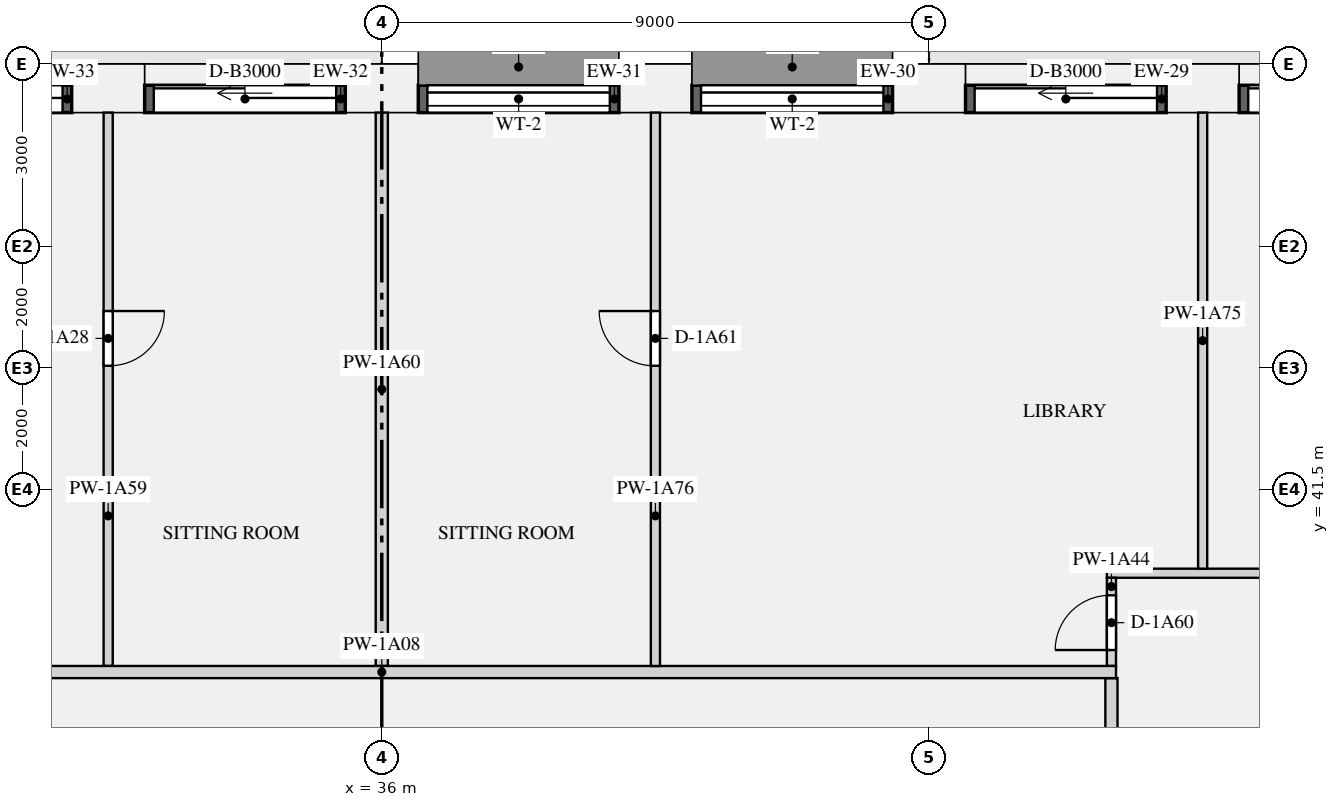
"""IFC4 building model, lengths in metres.
Left out: names, types, materials, properties, quantities, classifications, styles, units other than length and angle.
Written with IfcOpenShell. Run it as: python <this file> out.ifc"""

import sys

from ifc_helpers import new_model, si_unit, direction, frame, frame_2d, origin, origin_2d, place, context, subcontext, project, spatial, rectangle, extrude, element, fill, save


model = new_model("IFC4")
c1 = context("Model", 3, precision=1e-05, world=origin(), true_north=direction((0.0, 1.0)))
c2 = subcontext(c1, "Body", "Model", "MODEL_VIEW")
j1 = project(units=[si_unit("LENGTHUNIT", "METRE"), si_unit("PLANEANGLEUNIT", "RADIAN")], contexts=[c1])
p1 = place(None, origin())
s1 = spatial("IfcSite", under=j1, at=p1, CompositionType="ELEMENT")
p2 = place(p1, origin())
s2 = spatial("IfcBuilding", under=s1, at=p2, CompositionType="ELEMENT")
p3 = place(p2, frame((0.0, 0.0, 19.5)))
s3 = spatial("IfcBuildingStorey", under=s2, at=p3, CompositionType="ELEMENT", Elevation=19.5)
p4 = place(p3, frame((49.5, 48.1, -0.32), z_axis=(0.0, 0.0, 1.0), x_axis=(-1.0, 0.0, 0.0)))
e1 = element("IfcColumn", 1, at=p4, inside=s3, PredefinedType="USERDEFINED", context=c2, shape_type="SweptSolid", body=[
    extrude(rectangle(XDim=1.2, YDim=0.8, at=origin_2d()), origin(), (0.0, 0.0, 1.0), 3.47),
])
p5 = place(p3, frame((45.0, 48.1, 0.0), z_axis=(0.0, 0.0, 1.0), x_axis=(-1.0, 0.0, 0.0)))
e2 = element("IfcColumn", 2, at=p5, inside=s3, PredefinedType="USERDEFINED", context=c2, shape_type="SweptSolid", body=[
    extrude(rectangle(XDim=1.2, YDim=0.8, at=origin_2d()), origin(), (0.0, 0.0, 1.0), 3.15),
])
p6 = place(p3, frame((40.5, 48.1, -0.32), z_axis=(0.0, 0.0, 1.0), x_axis=(-1.0, 0.0, 0.0)))
e3 = element("IfcColumn", 3, at=p6, inside=s3, PredefinedType="USERDEFINED", context=c2, shape_type="SweptSolid", body=[
    extrude(rectangle(XDim=1.2, YDim=0.8, at=origin_2d()), origin(), (0.0, 0.0, 1.0), 3.47),
])
p7 = place(p3, frame((36.0, 48.1, 0.0), z_axis=(0.0, 0.0, 1.0), x_axis=(-1.0, 0.0, 0.0)))
e4 = element("IfcColumn", 4, at=p7, inside=s3, PredefinedType="USERDEFINED", context=c2, shape_type="SweptSolid", body=[
    extrude(rectangle(XDim=1.2, YDim=0.8, at=origin_2d()), origin(), (0.0, 0.0, 1.0), 3.15),
])
p8 = place(p3, frame((31.5, 48.1, -0.32), z_axis=(0.0, 0.0, 1.0), x_axis=(-1.0, 0.0, 0.0)))
e5 = element("IfcColumn", 5, at=p8, inside=s3, PredefinedType="USERDEFINED", context=c2, shape_type="SweptSolid", body=[
    extrude(rectangle(XDim=1.2, YDim=0.8, at=origin_2d()), origin(), (0.0, 0.0, 1.0), 3.47),
])
p9 = place(p3, frame((53.4, 47.925, 0.0), z_axis=(0.0, 0.0, 1.0), x_axis=(-1.0, 0.0, 0.0)))
e6 = element("IfcWall", 6, at=p9, inside=s3, PredefinedType="SOLIDWALL", context=c2, shape_type="SweptSolid", body=[
    extrude(rectangle(XDim=3.3, YDim=0.45, at=frame_2d((1.65, 0.0))), origin(), (0.0, 0.0, 1.0), 2.83),
])
p10 = place(p9, frame((0.15, 0.0, 0.0)))
e7 = element("IfcOpeningElement", 7, at=p10, cuts=e6, PredefinedType="OPENING", context=c2, shape_type="SweptSolid", body=[
    extrude(rectangle(XDim=3.0, YDim=2.3, at=frame_2d((1.5, 1.15))), frame((0.0, 0.235, 0.0), z_axis=(0.0, -1.0, 0.0), x_axis=(1.0, 0.0, 0.0)), (0.0, 0.0, 1.0), 0.47),
])
p11 = place(p3, frame((48.9, 47.925, 0.0), z_axis=(0.0, 0.0, 1.0), x_axis=(-1.0, 0.0, 0.0)))
e8 = element("IfcWall", 8, at=p11, inside=s3, PredefinedType="SOLIDWALL", context=c2, shape_type="SweptSolid", body=[
    extrude(rectangle(XDim=3.3, YDim=0.45, at=frame_2d((1.65, 0.0))), origin(), (0.0, 0.0, 1.0), 2.83),
])
p12 = place(p11, frame((0.15, 0.0, 0.0)))
e9 = element("IfcOpeningElement", 9, at=p12, cuts=e8, PredefinedType="OPENING", context=c2, shape_type="SweptSolid", body=[
    extrude(rectangle(XDim=3.0, YDim=2.3, at=frame_2d((1.5, 1.15))), frame((0.0, 0.235, 0.0), z_axis=(0.0, -1.0, 0.0), x_axis=(1.0, 0.0, 0.0)), (0.0, 0.0, 1.0), 0.47),
])
p13 = place(p3, frame((44.4, 47.925, 0.9), z_axis=(0.0, 0.0, 1.0), x_axis=(-1.0, 0.0, 0.0)))
e10 = element("IfcWall", 10, at=p13, inside=s3, PredefinedType="SOLIDWALL", context=c2, shape_type="SweptSolid", body=[
    extrude(rectangle(XDim=3.3, YDim=0.45, at=frame_2d((1.65, 0.0))), origin(), (0.0, 0.0, 1.0), 1.93),
])
p14 = place(p13, frame((0.15, 0.0, 0.15)))
e11 = element("IfcOpeningElement", 11, at=p14, cuts=e10, PredefinedType="OPENING", context=c2, shape_type="SweptSolid", body=[
    extrude(rectangle(XDim=3.0, YDim=1.5, at=frame_2d((1.5, 0.75))), frame((0.0, 0.235, 0.0), z_axis=(0.0, -1.0, 0.0), x_axis=(1.0, 0.0, 0.0)), (0.0, 0.0, 1.0), 0.47),
])
p15 = place(p3, frame((39.9, 47.925, 0.9), z_axis=(0.0, 0.0, 1.0), x_axis=(-1.0, 0.0, 0.0)))
e12 = element("IfcWall", 12, at=p15, inside=s3, PredefinedType="SOLIDWALL", context=c2, shape_type="SweptSolid", body=[
    extrude(rectangle(XDim=3.3, YDim=0.45, at=frame_2d((1.65, 0.0))), origin(), (0.0, 0.0, 1.0), 1.93),
])
p16 = place(p15, frame((0.15, 0.0, 0.15)))
e13 = element("IfcOpeningElement", 13, at=p16, cuts=e12, PredefinedType="OPENING", context=c2, shape_type="SweptSolid", body=[
    extrude(rectangle(XDim=3.0, YDim=1.5, at=frame_2d((1.5, 0.75))), frame((0.0, 0.235, 0.0), z_axis=(0.0, -1.0, 0.0), x_axis=(1.0, 0.0, 0.0)), (0.0, 0.0, 1.0), 0.47),
])
p17 = place(p3, frame((35.4, 47.925, 0.0), z_axis=(0.0, 0.0, 1.0), x_axis=(-1.0, 0.0, 0.0)))
e14 = element("IfcWall", 14, at=p17, inside=s3, PredefinedType="SOLIDWALL", context=c2, shape_type="SweptSolid", body=[
    extrude(rectangle(XDim=3.3, YDim=0.45, at=frame_2d((1.65, 0.0))), origin(), (0.0, 0.0, 1.0), 2.83),
])
p18 = place(p17, frame((0.15, 0.0, 0.0)))
e15 = element("IfcOpeningElement", 15, at=p18, cuts=e14, PredefinedType="OPENING", context=c2, shape_type="SweptSolid", body=[
    extrude(rectangle(XDim=3.0, YDim=2.3, at=frame_2d((1.5, 1.15))), frame((0.0, 0.235, 0.0), z_axis=(0.0, -1.0, 0.0), x_axis=(1.0, 0.0, 0.0)), (0.0, 0.0, 1.0), 0.47),
])
p19 = place(p3, frame((30.9, 47.925, 0.0), z_axis=(0.0, 0.0, 1.0), x_axis=(-1.0, 0.0, 0.0)))
e16 = element("IfcWall", 16, at=p19, inside=s3, PredefinedType="SOLIDWALL", context=c2, shape_type="SweptSolid", body=[
    extrude(rectangle(XDim=3.3, YDim=0.45, at=frame_2d((1.65, 0.0))), origin(), (0.0, 0.0, 1.0), 2.83),
])
p20 = place(p19, frame((0.15, 0.0, 0.0)))
e17 = element("IfcOpeningElement", 17, at=p20, cuts=e16, PredefinedType="OPENING", context=c2, shape_type="SweptSolid", body=[
    extrude(rectangle(XDim=3.0, YDim=2.3, at=frame_2d((1.5, 1.15))), frame((0.0, 0.235, 0.0), z_axis=(0.0, -1.0, 0.0), x_axis=(1.0, 0.0, 0.0)), (0.0, 0.0, 1.0), 0.47),
])
p21 = place(p3, frame((23.925, 38.5, 0.0), z_axis=(0.0, 0.0, 1.0), x_axis=(1.0, 0.0, 0.0)))
e18 = element("IfcWall", 18, at=p21, inside=s3, PredefinedType="PARTITIONING", context=c2, shape_type="SweptSolid", body=[
    extrude(rectangle(XDim=24.15, YDim=0.2, at=frame_2d((12.075, 0.0))), origin(), (0.0, 0.0, 1.0), 2.83),
])
p22 = place(p3, frame((47.925, 40.125, 0.0), z_axis=(0.0, 0.0, 1.0), x_axis=(1.0, 0.0, 0.0)))
e19 = element("IfcWall", 19, at=p22, inside=s3, PredefinedType="PARTITIONING", context=c2, shape_type="SweptSolid", body=[
    extrude(rectangle(XDim=27.775, YDim=0.15, at=frame_2d((13.887, 0.0))), origin(), (0.0, 0.0, 1.0), 2.83),
])
p23 = place(p22, frame((16.875, 0.0, 0.0)))
e20 = element("IfcOpeningElement", 20, at=p23, cuts=e19, PredefinedType="OPENING", context=c2, shape_type="SweptSolid", body=[
    extrude(rectangle(XDim=0.9, YDim=2.1, at=frame_2d((0.45, 1.05))), frame((0.0, 0.085, 0.0), z_axis=(0.0, -1.0, 0.0), x_axis=(1.0, 0.0, 0.0)), (0.0, 0.0, 1.0), 0.17),
])
p24 = place(p22, frame((13.025, 0.0, 0.0)))
e21 = element("IfcOpeningElement", 21, at=p24, cuts=e19, PredefinedType="OPENING", context=c2, shape_type="SweptSolid", body=[
    extrude(rectangle(XDim=0.9, YDim=2.1, at=frame_2d((0.45, 1.05))), frame((0.0, 0.085, 0.0), z_axis=(0.0, -1.0, 0.0), x_axis=(1.0, 0.0, 0.0)), (0.0, 0.0, 1.0), 0.17),
])
p25 = place(p22, frame((3.375, 0.0, 0.0)))
e22 = element("IfcOpeningElement", 22, at=p25, cuts=e19, PredefinedType="OPENING", context=c2, shape_type="SweptSolid", body=[
    extrude(rectangle(XDim=0.9, YDim=2.1, at=frame_2d((0.45, 1.05))), frame((0.0, 0.085, 0.0), z_axis=(0.0, -1.0, 0.0), x_axis=(1.0, 0.0, 0.0)), (0.0, 0.0, 1.0), 0.17),
])
p26 = place(p22, frame((25.55, 0.0, 0.0)))
e23 = element("IfcOpeningElement", 23, at=p26, cuts=e19, PredefinedType="OPENING", context=c2, shape_type="SweptSolid", body=[
    extrude(rectangle(XDim=0.9, YDim=2.1, at=frame_2d((0.45, 1.05))), frame((0.0, 0.085, 0.0), z_axis=(0.0, -1.0, 0.0), x_axis=(1.0, 0.0, 0.0)), (0.0, 0.0, 1.0), 0.17),
])
p27 = place(p3, frame((48.0, 38.6, 0.0), z_axis=(0.0, 0.0, 1.0), x_axis=(0.0, 1.0, 0.0)))
e24 = element("IfcWall", 24, at=p27, inside=s3, PredefinedType="PARTITIONING", context=c2, shape_type="SweptSolid", body=[
    extrude(rectangle(XDim=1.45, YDim=0.15, at=frame_2d((0.725, 0.0))), origin(), (0.0, 0.0, 1.0), 2.83),
])
p28 = place(p27, frame((0.262, 0.0, 0.0)))
e25 = element("IfcOpeningElement", 25, at=p28, cuts=e24, PredefinedType="OPENING", context=c2, shape_type="SweptSolid", body=[
    extrude(rectangle(XDim=0.9, YDim=2.1, at=frame_2d((0.45, 1.05))), frame((0.0, 0.085, 0.0), z_axis=(0.0, -1.0, 0.0), x_axis=(1.0, 0.0, 0.0)), (0.0, 0.0, 1.0), 0.17),
])
p29 = place(p3, frame((48.0, 27.1, 0.0), z_axis=(0.0, 0.0, 1.0), x_axis=(0.0, 1.0, 0.0)))
e26 = element("IfcWall", 26, at=p29, inside=s3, PredefinedType="PARTITIONING", context=c2, shape_type="SweptSolid", body=[
    extrude(rectangle(XDim=11.3, YDim=0.2, at=frame_2d((5.65, 0.0))), origin(), (0.0, 0.0, 1.0), 2.83),
])
p30 = place(p29, frame((5.35, 0.0, 0.0)))
e27 = element("IfcOpeningElement", 27, at=p30, cuts=e26, PredefinedType="OPENING", context=c2, shape_type="SweptSolid", body=[
    extrude(rectangle(XDim=1.1, YDim=2.1, at=frame_2d((0.55, 1.05))), frame((0.0, 0.11, 0.0), z_axis=(0.0, -1.0, 0.0), x_axis=(1.0, 0.0, 0.0)), (0.0, 0.0, 1.0), 0.22),
])
p31 = place(p3, frame((31.5, 38.6, 0.0), z_axis=(0.0, 0.0, 1.0), x_axis=(0.0, 1.0, 0.0)))
e28 = element("IfcWall", 28, at=p31, inside=s3, PredefinedType="PARTITIONING", context=c2, shape_type="SweptSolid", body=[
    extrude(rectangle(XDim=9.1, YDim=0.15, at=frame_2d((4.55, 0.0))), origin(), (0.0, 0.0, 1.0), 2.83),
])
p32 = place(p31, frame((4.937, 0.0, 0.0)))
e29 = element("IfcOpeningElement", 29, at=p32, cuts=e28, PredefinedType="OPENING", context=c2, shape_type="SweptSolid", body=[
    extrude(rectangle(XDim=0.9, YDim=2.1, at=frame_2d((0.45, 1.05))), frame((0.0, 0.085, 0.0), z_axis=(0.0, -1.0, 0.0), x_axis=(1.0, 0.0, 0.0)), (0.0, 0.0, 1.0), 0.17),
])
p33 = place(p3, frame((36.0, 38.6, 0.0), z_axis=(0.0, 0.0, 1.0), x_axis=(0.0, 1.0, 0.0)))
e30 = element("IfcWall", 30, at=p33, inside=s3, PredefinedType="PARTITIONING", context=c2, shape_type="SweptSolid", body=[
    extrude(rectangle(XDim=9.1, YDim=0.2, at=frame_2d((4.55, 0.0))), origin(), (0.0, 0.0, 1.0), 2.83),
])
p34 = place(p3, frame((49.5, 40.2, 0.0), z_axis=(0.0, 0.0, 1.0), x_axis=(0.0, 1.0, 0.0)))
e31 = element("IfcWall", 31, at=p34, inside=s3, PredefinedType="PARTITIONING", context=c2, shape_type="SweptSolid", body=[
    extrude(rectangle(XDim=7.5, YDim=0.15, at=frame_2d((3.75, 0.0))), origin(), (0.0, 0.0, 1.0), 2.83),
])
p35 = place(p3, frame((40.5, 38.6, 0.0), z_axis=(0.0, 0.0, 1.0), x_axis=(0.0, 1.0, 0.0)))
e32 = element("IfcWall", 32, at=p35, inside=s3, PredefinedType="PARTITIONING", context=c2, shape_type="SweptSolid", body=[
    extrude(rectangle(XDim=9.1, YDim=0.15, at=frame_2d((4.55, 0.0))), origin(), (0.0, 0.0, 1.0), 2.83),
])
p36 = place(p35, frame((4.937, 0.0, 0.0)))
e33 = element("IfcOpeningElement", 33, at=p36, cuts=e32, PredefinedType="OPENING", context=c2, shape_type="SweptSolid", body=[
    extrude(rectangle(XDim=0.9, YDim=2.1, at=frame_2d((0.45, 1.05))), frame((0.0, 0.085, 0.0), z_axis=(0.0, -1.0, 0.0), x_axis=(1.0, 0.0, 0.0)), (0.0, 0.0, 1.0), 0.17),
])
p37 = place(p10, origin())
e34 = element("IfcDoor", 34, at=p37, inside=s3, OperationType="SLIDING_TO_LEFT", PredefinedType="DOOR", context=c2, shape_type="SweptSolid", body=[
    extrude(rectangle(XDim=3.0, YDim=2.3, at=frame_2d((1.5, 1.15))), frame((0.0, -0.07, 0.0), z_axis=(0.0, -1.0, 0.0), x_axis=(1.0, 0.0, 0.0)), (0.0, 0.0, 1.0), 0.05),
])
fill(e7, e34)
p38 = place(p12, origin())
e35 = element("IfcDoor", 35, at=p38, inside=s3, OperationType="SLIDING_TO_LEFT", PredefinedType="DOOR", context=c2, shape_type="SweptSolid", body=[
    extrude(rectangle(XDim=3.0, YDim=2.3, at=frame_2d((1.5, 1.15))), frame((0.0, -0.07, 0.0), z_axis=(0.0, -1.0, 0.0), x_axis=(1.0, 0.0, 0.0)), (0.0, 0.0, 1.0), 0.05),
])
fill(e9, e35)
p39 = place(p14, origin())
e36 = element("IfcWindow", 36, at=p39, inside=s3, PartitioningType="SINGLE_PANEL", PredefinedType="WINDOW", context=c2, shape_type="SweptSolid", body=[
    extrude(rectangle(XDim=3.0, YDim=1.5, at=frame_2d((1.5, 0.75))), frame((0.0, -0.065, 0.0), z_axis=(0.0, -1.0, 0.0), x_axis=(1.0, 0.0, 0.0)), (0.0, 0.0, 1.0), 0.06),
])
fill(e11, e36)
p40 = place(p16, origin())
e37 = element("IfcWindow", 37, at=p40, inside=s3, PartitioningType="SINGLE_PANEL", PredefinedType="WINDOW", context=c2, shape_type="SweptSolid", body=[
    extrude(rectangle(XDim=3.0, YDim=1.5, at=frame_2d((1.5, 0.75))), frame((0.0, -0.065, 0.0), z_axis=(0.0, -1.0, 0.0), x_axis=(1.0, 0.0, 0.0)), (0.0, 0.0, 1.0), 0.06),
])
fill(e13, e37)
p41 = place(p18, origin())
e38 = element("IfcDoor", 38, at=p41, inside=s3, OperationType="SLIDING_TO_LEFT", PredefinedType="DOOR", context=c2, shape_type="SweptSolid", body=[
    extrude(rectangle(XDim=3.0, YDim=2.3, at=frame_2d((1.5, 1.15))), frame((0.0, -0.07, 0.0), z_axis=(0.0, -1.0, 0.0), x_axis=(1.0, 0.0, 0.0)), (0.0, 0.0, 1.0), 0.05),
])
fill(e15, e38)
p42 = place(p20, origin())
e39 = element("IfcDoor", 39, at=p42, inside=s3, OperationType="SLIDING_TO_LEFT", PredefinedType="DOOR", context=c2, shape_type="SweptSolid", body=[
    extrude(rectangle(XDim=3.0, YDim=2.3, at=frame_2d((1.5, 1.15))), frame((0.0, -0.07, 0.0), z_axis=(0.0, -1.0, 0.0), x_axis=(1.0, 0.0, 0.0)), (0.0, 0.0, 1.0), 0.05),
])
fill(e17, e39)
p43 = place(p32, frame((0.9, 0.0, 0.0), z_axis=(0.0, 0.0, 1.0), x_axis=(-1.0, 0.0, 0.0)))
e40 = element("IfcDoor", 40, at=p43, inside=s3, OperationType="SINGLE_SWING_LEFT", PredefinedType="DOOR", context=c2, shape_type="SweptSolid", body=[
    extrude(rectangle(XDim=0.9, YDim=2.1, at=frame_2d((0.45, 1.05))), frame((0.0, 0.025, 0.0), z_axis=(0.0, -1.0, 0.0), x_axis=(1.0, 0.0, 0.0)), (0.0, 0.0, 1.0), 0.05),
])
fill(e29, e40)
p44 = place(p28, origin())
e41 = element("IfcDoor", 41, at=p44, inside=s3, OperationType="SINGLE_SWING_LEFT", PredefinedType="DOOR", context=c2, shape_type="SweptSolid", body=[
    extrude(rectangle(XDim=0.9, YDim=2.1, at=frame_2d((0.45, 1.05))), frame((0.0, 0.025, 0.0), z_axis=(0.0, -1.0, 0.0), x_axis=(1.0, 0.0, 0.0)), (0.0, 0.0, 1.0), 0.05),
])
fill(e25, e41)
p45 = place(p36, origin())
e42 = element("IfcDoor", 42, at=p45, inside=s3, OperationType="SINGLE_SWING_RIGHT", PredefinedType="DOOR", context=c2, shape_type="SweptSolid", body=[
    extrude(rectangle(XDim=0.9, YDim=2.1, at=frame_2d((0.45, 1.05))), frame((0.0, 0.025, 0.0), z_axis=(0.0, -1.0, 0.0), x_axis=(1.0, 0.0, 0.0)), (0.0, 0.0, 1.0), 0.05),
])
fill(e33, e42)
save(model, sys.argv[1])
